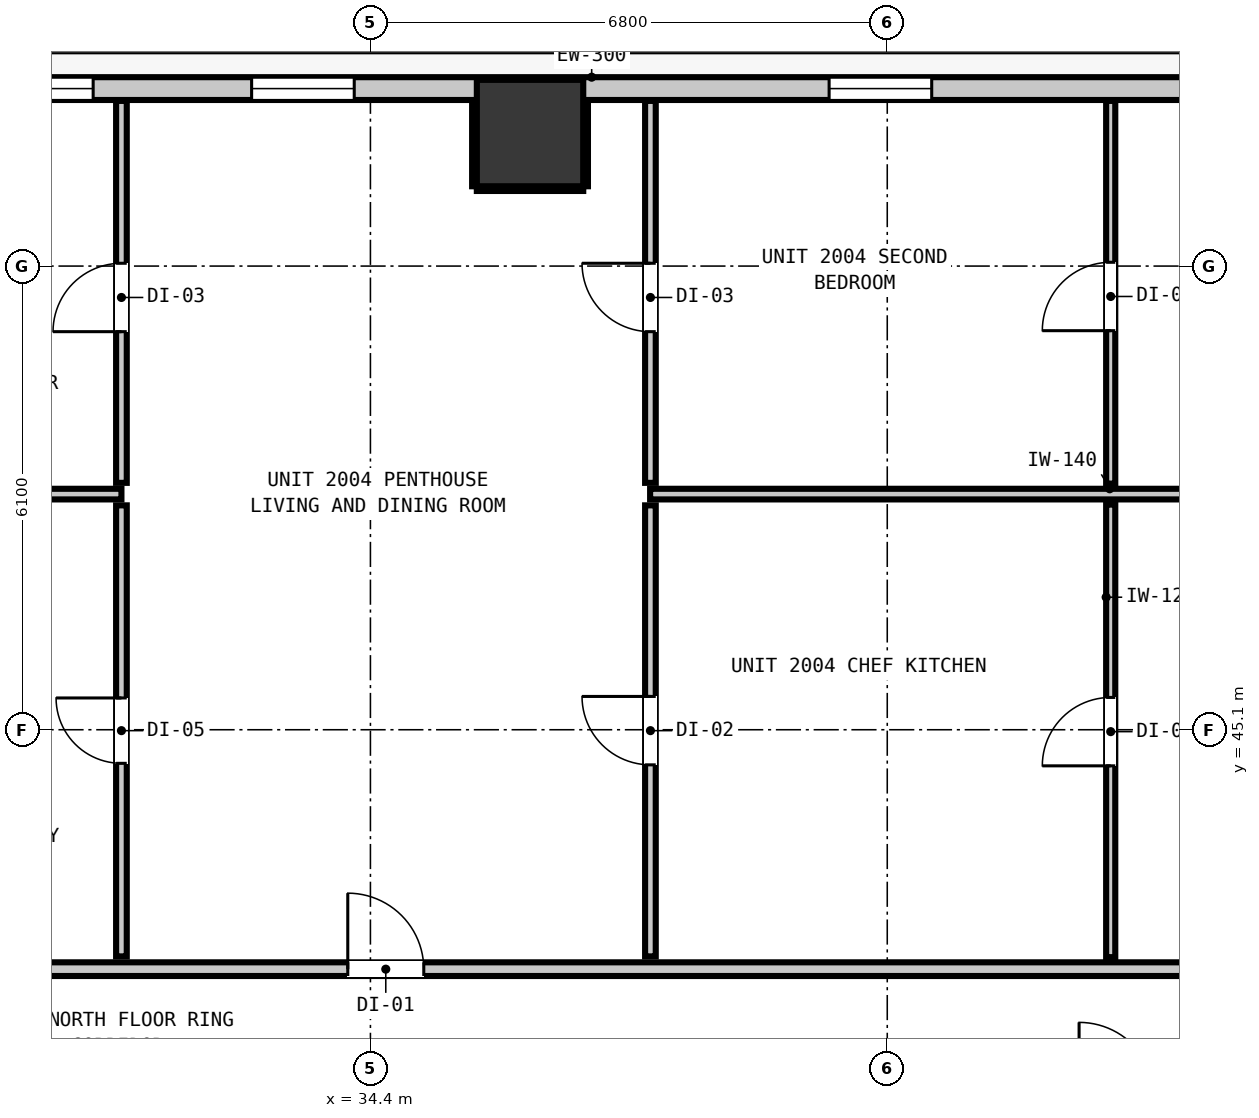
"""IFC4 building model, lengths in metres.
Left out: names, types, materials, properties, quantities, classifications, styles, units other than length and angle.
Written with IfcOpenShell. Run it as: python <this file> out.ifc"""

import sys

from ifc_helpers import new_model, si_unit, direction, frame, frame_2d, origin, origin_2d, place, context, subcontext, project, spatial, rectangle, extrude, element, fill, save


model = new_model("IFC4")
c1 = context("Model", 3, precision=1e-05, world=origin(), true_north=direction((0.0, 1.0)))
c2 = subcontext(c1, "Body", "Model", "MODEL_VIEW")
j1 = project(units=[si_unit("LENGTHUNIT", "METRE"), si_unit("PLANEANGLEUNIT", "RADIAN")], contexts=[c1])
p1 = place(None, origin())
s1 = spatial("IfcSite", under=j1, at=p1, CompositionType="ELEMENT")
p2 = place(p1, origin())
s2 = spatial("IfcBuilding", under=s1, at=p2, CompositionType="ELEMENT")
p3 = place(p2, frame((0.0, 0.0, 71.8)))
s3 = spatial("IfcBuildingStorey", under=s2, at=p3, CompositionType="ELEMENT", Elevation=71.8)
p4 = place(p3, frame((36.5, 52.95, 0.0), z_axis=(0.0, 0.0, 1.0), x_axis=(1.0, 0.0, 0.0)))
e1 = element("IfcColumn", 1, at=p4, inside=s3, PredefinedType="COLUMN", context=c2, shape_type="SweptSolid", body=[
    extrude(rectangle(XDim=1.4, YDim=1.4, at=origin_2d()), origin(), (0.0, 0.0, 1.0), 3.32),
])
p5 = place(p3, frame((10.365, 53.535, 0.0), z_axis=(0.0, 0.0, 1.0), x_axis=(1.0, 0.0, 0.0)))
e2 = element("IfcWall", 2, at=p5, inside=s3, PredefinedType="STANDARD", context=c2, shape_type="SweptSolid", body=[
    extrude(rectangle(XDim=37.47, YDim=0.3, at=frame_2d((18.735, 0.0))), origin(), (0.0, 0.0, 1.0), 3.06),
])
p6 = place(p5, frame((4.403, 0.0, 0.0)))
e3 = element("IfcOpeningElement", 3, at=p6, cuts=e2, PredefinedType="OPENING", context=c2, shape_type="SweptSolid", body=[
    extrude(rectangle(XDim=1.0, YDim=2.15, at=frame_2d((0.5, 1.075))), frame((0.0, 0.16, 0.0), z_axis=(0.0, -1.0, 0.0), x_axis=(1.0, 0.0, 0.0)), (0.0, 0.0, 1.0), 0.32),
])
p7 = place(p5, frame((6.994, 0.0, 0.85)))
e4 = element("IfcOpeningElement", 4, at=p7, cuts=e2, PredefinedType="OPENING", context=c2, shape_type="SweptSolid", body=[
    extrude(rectangle(XDim=1.35, YDim=1.85, at=frame_2d((0.675, 0.925))), frame((0.0, 0.16, 0.0), z_axis=(0.0, -1.0, 0.0), x_axis=(1.0, 0.0, 0.0)), (0.0, 0.0, 1.0), 0.32),
])
p8 = place(p5, frame((0.324, 0.0, 0.85)))
e5 = element("IfcOpeningElement", 5, at=p8, cuts=e2, PredefinedType="OPENING", context=c2, shape_type="SweptSolid", body=[
    extrude(rectangle(XDim=0.58, YDim=1.5, at=frame_2d((0.29, 0.75))), frame((0.0, 0.16, 0.0), z_axis=(0.0, -1.0, 0.0), x_axis=(1.0, 0.0, 0.0)), (0.0, 0.0, 1.0), 0.32),
])
p9 = place(p5, frame((13.896, 0.0, 0.85)))
e6 = element("IfcOpeningElement", 6, at=p9, cuts=e2, PredefinedType="OPENING", context=c2, shape_type="SweptSolid", body=[
    extrude(rectangle(XDim=1.35, YDim=1.85, at=frame_2d((0.675, 0.925))), frame((0.0, 0.16, 0.0), z_axis=(0.0, -1.0, 0.0), x_axis=(1.0, 0.0, 0.0)), (0.0, 0.0, 1.0), 0.32),
])
p10 = place(p5, frame((22.472, 0.0, 0.85)))
e7 = element("IfcOpeningElement", 7, at=p10, cuts=e2, PredefinedType="OPENING", context=c2, shape_type="SweptSolid", body=[
    extrude(rectangle(XDim=1.35, YDim=1.85, at=frame_2d((0.675, 0.925))), frame((0.0, 0.16, 0.0), z_axis=(0.0, -1.0, 0.0), x_axis=(1.0, 0.0, 0.0)), (0.0, 0.0, 1.0), 0.32),
])
p11 = place(p5, frame((19.807, 0.0, 0.85)))
e8 = element("IfcOpeningElement", 8, at=p11, cuts=e2, PredefinedType="OPENING", context=c2, shape_type="SweptSolid", body=[
    extrude(rectangle(XDim=0.58, YDim=1.5, at=frame_2d((0.29, 0.75))), frame((0.0, 0.16, 0.0), z_axis=(0.0, -1.0, 0.0), x_axis=(1.0, 0.0, 0.0)), (0.0, 0.0, 1.0), 0.32),
])
p12 = place(p5, frame((30.07, 0.0, 0.85)))
e9 = element("IfcOpeningElement", 9, at=p12, cuts=e2, PredefinedType="OPENING", context=c2, shape_type="SweptSolid", body=[
    extrude(rectangle(XDim=1.35, YDim=1.85, at=frame_2d((0.675, 0.925))), frame((0.0, 0.16, 0.0), z_axis=(0.0, -1.0, 0.0), x_axis=(1.0, 0.0, 0.0)), (0.0, 0.0, 1.0), 0.32),
])
p13 = place(p5, frame((34.953, 0.0, 0.85)))
e10 = element("IfcOpeningElement", 10, at=p13, cuts=e2, PredefinedType="OPENING", context=c2, shape_type="SweptSolid", body=[
    extrude(rectangle(XDim=1.35, YDim=1.85, at=frame_2d((0.675, 0.925))), frame((0.0, 0.16, 0.0), z_axis=(0.0, -1.0, 0.0), x_axis=(1.0, 0.0, 0.0)), (0.0, 0.0, 1.0), 0.32),
])
p14 = place(p3, frame((8.027, 41.95, 0.0), z_axis=(0.0, 0.0, 1.0), x_axis=(1.0, 0.0, 0.0)))
e11 = element("IfcWall", 11, at=p14, inside=s3, PredefinedType="PARTITIONING", context=c2, shape_type="SweptSolid", body=[
    extrude(rectangle(XDim=42.146, YDim=0.18, at=frame_2d((21.073, 0.0))), origin(), (0.0, 0.0, 1.0), 3.06),
])
p15 = place(p14, frame((8.451, 0.0, 0.0)))
e12 = element("IfcOpeningElement", 12, at=p15, cuts=e11, PredefinedType="OPENING", context=c2, shape_type="SweptSolid", body=[
    extrude(rectangle(XDim=1.0, YDim=2.15, at=frame_2d((0.5, 1.075))), frame((0.0, 0.1, 0.0), z_axis=(0.0, -1.0, 0.0), x_axis=(1.0, 0.0, 0.0)), (0.0, 0.0, 1.0), 0.2),
])
p16 = place(p14, frame((26.075, 0.0, 0.0)))
e13 = element("IfcOpeningElement", 13, at=p16, cuts=e11, PredefinedType="OPENING", context=c2, shape_type="SweptSolid", body=[
    extrude(rectangle(XDim=1.0, YDim=2.15, at=frame_2d((0.5, 1.075))), frame((0.0, 0.1, 0.0), z_axis=(0.0, -1.0, 0.0), x_axis=(1.0, 0.0, 0.0)), (0.0, 0.0, 1.0), 0.2),
])
p17 = place(p3, frame((8.027, 48.2, 0.0), z_axis=(0.0, 0.0, 1.0), x_axis=(1.0, 0.0, 0.0)))
e14 = element("IfcWall", 14, at=p17, inside=s3, PredefinedType="PARTITIONING", context=c2, shape_type="SweptSolid", body=[
    extrude(rectangle(XDim=23.097, YDim=0.14, at=frame_2d((11.548, 0.0))), origin(), (0.0, 0.0, 1.0), 3.06),
])
p18 = place(p17, frame((8.501, 0.0, 0.0)))
e15 = element("IfcOpeningElement", 15, at=p18, cuts=e14, PredefinedType="OPENING", context=c2, shape_type="SweptSolid", body=[
    extrude(rectangle(XDim=0.9, YDim=2.1, at=frame_2d((0.45, 1.05))), frame((0.0, 0.08, 0.0), z_axis=(0.0, -1.0, 0.0), x_axis=(1.0, 0.0, 0.0)), (0.0, 0.0, 1.0), 0.16),
])
p19 = place(p3, frame((38.08, 48.2, 0.0), z_axis=(0.0, 0.0, 1.0), x_axis=(1.0, 0.0, 0.0)))
e16 = element("IfcWall", 16, at=p19, inside=s3, PredefinedType="PARTITIONING", context=c2, shape_type="SweptSolid", body=[
    extrude(rectangle(XDim=12.093, YDim=0.14, at=frame_2d((6.046, 0.0))), origin(), (0.0, 0.0, 1.0), 3.06),
])
p20 = place(p3, frame((31.124, 42.118, 0.0), z_axis=(0.0, 0.0, 1.0), x_axis=(0.0, 1.0, 0.0)))
e17 = element("IfcWall", 17, at=p20, inside=s3, PredefinedType="PARTITIONING", context=c2, shape_type="SweptSolid", body=[
    extrude(rectangle(XDim=5.934, YDim=0.14, at=frame_2d((2.967, 0.0))), origin(), (0.0, 0.0, 1.0), 3.06),
])
p21 = place(p20, frame((2.54, 0.0, 0.0)))
e18 = element("IfcOpeningElement", 18, at=p21, cuts=e17, PredefinedType="OPENING", context=c2, shape_type="SweptSolid", body=[
    extrude(rectangle(XDim=0.86, YDim=2.02, at=frame_2d((0.43, 1.01))), frame((0.0, 0.08, 0.0), z_axis=(0.0, -1.0, 0.0), x_axis=(1.0, 0.0, 0.0)), (0.0, 0.0, 1.0), 0.16),
])
p22 = place(p3, frame((31.124, 48.348, 0.0), z_axis=(0.0, 0.0, 1.0), x_axis=(0.0, 1.0, 0.0)))
e19 = element("IfcWall", 19, at=p22, inside=s3, PredefinedType="PARTITIONING", context=c2, shape_type="SweptSolid", body=[
    extrude(rectangle(XDim=5.025, YDim=0.14, at=frame_2d((2.513, 0.0))), origin(), (0.0, 0.0, 1.0), 3.06),
])
p23 = place(p22, frame((1.989, 0.0, 0.0)))
e20 = element("IfcOpeningElement", 20, at=p23, cuts=e19, PredefinedType="OPENING", context=c2, shape_type="SweptSolid", body=[
    extrude(rectangle(XDim=0.9, YDim=2.1, at=frame_2d((0.45, 1.05))), frame((0.0, 0.08, 0.0), z_axis=(0.0, -1.0, 0.0), x_axis=(1.0, 0.0, 0.0)), (0.0, 0.0, 1.0), 0.16),
])
p24 = place(p3, frame((38.084, 42.118, 0.0), z_axis=(0.0, 0.0, 1.0), x_axis=(0.0, 1.0, 0.0)))
e21 = element("IfcWall", 21, at=p24, inside=s3, PredefinedType="PARTITIONING", context=c2, shape_type="SweptSolid", body=[
    extrude(rectangle(XDim=5.934, YDim=0.14, at=frame_2d((2.967, 0.0))), origin(), (0.0, 0.0, 1.0), 3.06),
])
p25 = place(p24, frame((2.52, 0.0, 0.0)))
e22 = element("IfcOpeningElement", 22, at=p25, cuts=e21, PredefinedType="OPENING", context=c2, shape_type="SweptSolid", body=[
    extrude(rectangle(XDim=0.9, YDim=2.1, at=frame_2d((0.45, 1.05))), frame((0.0, 0.08, 0.0), z_axis=(0.0, -1.0, 0.0), x_axis=(1.0, 0.0, 0.0)), (0.0, 0.0, 1.0), 0.16),
])
p26 = place(p3, frame((38.084, 48.348, 0.0), z_axis=(0.0, 0.0, 1.0), x_axis=(0.0, 1.0, 0.0)))
e23 = element("IfcWall", 23, at=p26, inside=s3, PredefinedType="PARTITIONING", context=c2, shape_type="SweptSolid", body=[
    extrude(rectangle(XDim=5.025, YDim=0.14, at=frame_2d((2.513, 0.0))), origin(), (0.0, 0.0, 1.0), 3.06),
])
p27 = place(p26, frame((1.989, 0.0, 0.0)))
e24 = element("IfcOpeningElement", 24, at=p27, cuts=e23, PredefinedType="OPENING", context=c2, shape_type="SweptSolid", body=[
    extrude(rectangle(XDim=0.9, YDim=2.1, at=frame_2d((0.45, 1.05))), frame((0.0, 0.08, 0.0), z_axis=(0.0, -1.0, 0.0), x_axis=(1.0, 0.0, 0.0)), (0.0, 0.0, 1.0), 0.16),
])
p28 = place(p3, frame((44.14, 42.108, 0.0), z_axis=(0.0, 0.0, 1.0), x_axis=(0.0, 1.0, 0.0)))
e25 = element("IfcWall", 25, at=p28, inside=s3, PredefinedType="PARTITIONING", context=c2, shape_type="SweptSolid", body=[
    extrude(rectangle(XDim=5.954, YDim=0.12, at=frame_2d((2.977, 0.0))), origin(), (0.0, 0.0, 1.0), 3.06),
])
p29 = place(p28, frame((2.517, 0.0, 0.0)))
e26 = element("IfcOpeningElement", 26, at=p29, cuts=e25, PredefinedType="OPENING", context=c2, shape_type="SweptSolid", body=[
    extrude(rectangle(XDim=0.9, YDim=2.1, at=frame_2d((0.45, 1.05))), frame((0.0, 0.07, 0.0), z_axis=(0.0, -1.0, 0.0), x_axis=(1.0, 0.0, 0.0)), (0.0, 0.0, 1.0), 0.14),
])
p30 = place(p3, frame((44.14, 48.338, 0.0), z_axis=(0.0, 0.0, 1.0), x_axis=(0.0, 1.0, 0.0)))
e27 = element("IfcWall", 27, at=p30, inside=s3, PredefinedType="PARTITIONING", context=c2, shape_type="SweptSolid", body=[
    extrude(rectangle(XDim=5.035, YDim=0.12, at=frame_2d((2.518, 0.0))), origin(), (0.0, 0.0, 1.0), 3.06),
])
p31 = place(p30, frame((2.012, 0.0, 0.0)))
e28 = element("IfcOpeningElement", 28, at=p31, cuts=e27, PredefinedType="OPENING", context=c2, shape_type="SweptSolid", body=[
    extrude(rectangle(XDim=0.9, YDim=2.1, at=frame_2d((0.45, 1.05))), frame((0.0, 0.07, 0.0), z_axis=(0.0, -1.0, 0.0), x_axis=(1.0, 0.0, 0.0)), (0.0, 0.0, 1.0), 0.14),
])
p32 = place(p3, frame((35.8, 52.218, 0.0), z_axis=(0.0, 0.0, 1.0), x_axis=(1.0, 0.0, 0.0)))
e29 = element("IfcWall", 29, at=p32, inside=s3, PredefinedType="PARTITIONING", context=c2, shape_type="SweptSolid", body=[
    extrude(rectangle(XDim=1.4, YDim=0.06, at=frame_2d((0.7, 0.0))), origin(), (0.0, 0.0, 1.0), 1.45),
])
for number, where, z_axis, x_axis in (
    (30, (35.768, 52.25, 0.0), (0.0, 0.0, 1.0), (0.0, 1.0, 0.0)),
    (31, (37.232, 52.25, 0.0), (0.0, 0.0, 1.0), (0.0, 1.0, 0.0)),
):
    element("IfcWall", number, at=place(p3, frame(where, z_axis=z_axis, x_axis=x_axis)), inside=s3, PredefinedType="PARTITIONING", context=c2, shape_type="SweptSolid", body=[
        extrude(rectangle(XDim=1.12, YDim=0.06, at=frame_2d((0.56, 0.0))), origin(), (0.0, 0.0, 1.0), 1.45),
    ])
p33 = place(p10, origin())
e32 = element("IfcWindow", 32, at=p33, inside=s3, PartitioningType="SINGLE_PANEL", PredefinedType="WINDOW", context=c2, shape_type="SweptSolid", body=[
    extrude(rectangle(XDim=1.35, YDim=1.85, at=frame_2d((0.675, 0.925))), frame((0.0, 0.03, 0.0), z_axis=(0.0, -1.0, 0.0), x_axis=(1.0, 0.0, 0.0)), (0.0, 0.0, 1.0), 0.06),
])
fill(e7, e32)
p34 = place(p11, origin())
e33 = element("IfcWindow", 33, at=p34, inside=s3, PartitioningType="SINGLE_PANEL", PredefinedType="WINDOW", context=c2, shape_type="SweptSolid", body=[
    extrude(rectangle(XDim=0.58, YDim=1.5, at=frame_2d((0.29, 0.75))), frame((0.0, 0.03, 0.0), z_axis=(0.0, -1.0, 0.0), x_axis=(1.0, 0.0, 0.0)), (0.0, 0.0, 1.0), 0.06),
])
fill(e8, e33)
p35 = place(p12, origin())
e34 = element("IfcWindow", 34, at=p35, inside=s3, PartitioningType="SINGLE_PANEL", PredefinedType="WINDOW", context=c2, shape_type="SweptSolid", body=[
    extrude(rectangle(XDim=1.35, YDim=1.85, at=frame_2d((0.675, 0.925))), frame((0.0, 0.03, 0.0), z_axis=(0.0, -1.0, 0.0), x_axis=(1.0, 0.0, 0.0)), (0.0, 0.0, 1.0), 0.06),
])
fill(e9, e34)
p36 = place(p16, origin())
e35 = element("IfcDoor", 35, at=p36, inside=s3, OperationType="SINGLE_SWING_LEFT", PredefinedType="DOOR", context=c2, shape_type="SweptSolid", body=[
    extrude(rectangle(XDim=1.0, YDim=2.15, at=frame_2d((0.5, 1.075))), frame((0.0, 0.025, 0.0), z_axis=(0.0, -1.0, 0.0), x_axis=(1.0, 0.0, 0.0)), (0.0, 0.0, 1.0), 0.05),
])
fill(e13, e35)
p37 = place(p21, origin())
e36 = element("IfcDoor", 36, at=p37, inside=s3, OperationType="SINGLE_SWING_RIGHT", PredefinedType="DOOR", context=c2, shape_type="SweptSolid", body=[
    extrude(rectangle(XDim=0.86, YDim=2.02, at=frame_2d((0.43, 1.01))), frame((0.0, 0.025, 0.0), z_axis=(0.0, -1.0, 0.0), x_axis=(1.0, 0.0, 0.0)), (0.0, 0.0, 1.0), 0.05),
])
fill(e18, e36)
p38 = place(p23, origin())
e37 = element("IfcDoor", 37, at=p38, inside=s3, OperationType="SINGLE_SWING_LEFT", PredefinedType="DOOR", context=c2, shape_type="SweptSolid", body=[
    extrude(rectangle(XDim=0.9, YDim=2.1, at=frame_2d((0.45, 1.05))), frame((0.0, 0.025, 0.0), z_axis=(0.0, -1.0, 0.0), x_axis=(1.0, 0.0, 0.0)), (0.0, 0.0, 1.0), 0.05),
])
fill(e20, e37)
p39 = place(p25, origin())
e38 = element("IfcDoor", 38, at=p39, inside=s3, OperationType="SINGLE_SWING_RIGHT", PredefinedType="DOOR", context=c2, shape_type="SweptSolid", body=[
    extrude(rectangle(XDim=0.9, YDim=2.1, at=frame_2d((0.45, 1.05))), frame((0.0, 0.025, 0.0), z_axis=(0.0, -1.0, 0.0), x_axis=(1.0, 0.0, 0.0)), (0.0, 0.0, 1.0), 0.05),
])
fill(e22, e38)
p40 = place(p29, origin())
e39 = element("IfcDoor", 39, at=p40, inside=s3, OperationType="SINGLE_SWING_LEFT", PredefinedType="DOOR", context=c2, shape_type="SweptSolid", body=[
    extrude(rectangle(XDim=0.9, YDim=2.1, at=frame_2d((0.45, 1.05))), frame((0.0, 0.025, 0.0), z_axis=(0.0, -1.0, 0.0), x_axis=(1.0, 0.0, 0.0)), (0.0, 0.0, 1.0), 0.05),
])
fill(e26, e39)
p41 = place(p27, origin())
e40 = element("IfcDoor", 40, at=p41, inside=s3, OperationType="SINGLE_SWING_RIGHT", PredefinedType="DOOR", context=c2, shape_type="SweptSolid", body=[
    extrude(rectangle(XDim=0.9, YDim=2.1, at=frame_2d((0.45, 1.05))), frame((0.0, 0.025, 0.0), z_axis=(0.0, -1.0, 0.0), x_axis=(1.0, 0.0, 0.0)), (0.0, 0.0, 1.0), 0.05),
])
fill(e24, e40)
p42 = place(p31, origin())
e41 = element("IfcDoor", 41, at=p42, inside=s3, OperationType="SINGLE_SWING_LEFT", PredefinedType="DOOR", context=c2, shape_type="SweptSolid", body=[
    extrude(rectangle(XDim=0.9, YDim=2.1, at=frame_2d((0.45, 1.05))), frame((0.0, 0.025, 0.0), z_axis=(0.0, -1.0, 0.0), x_axis=(1.0, 0.0, 0.0)), (0.0, 0.0, 1.0), 0.05),
])
fill(e28, e41)
save(model, sys.argv[1])
